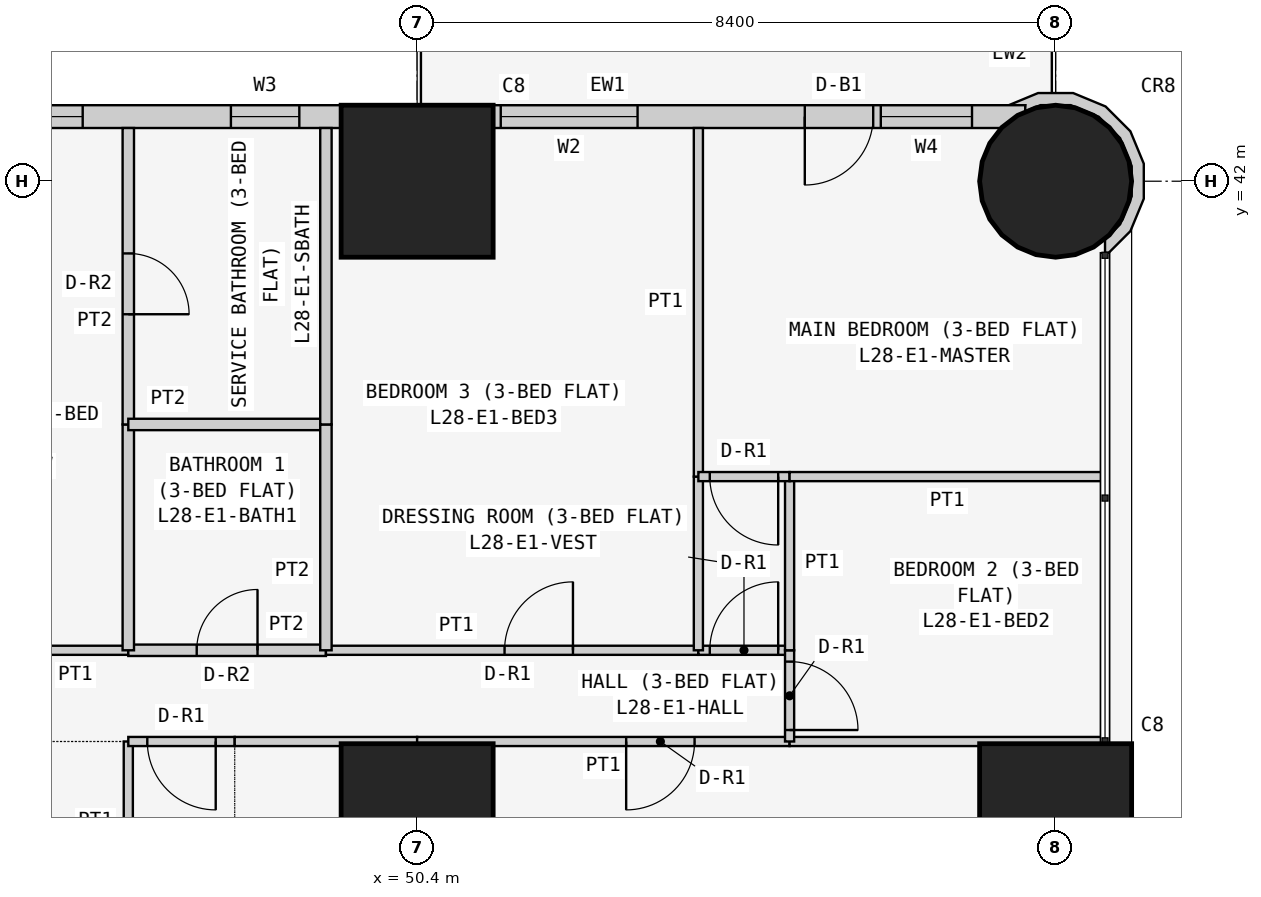
"""IFC4 building model, lengths in metres.
Left out: names, types, materials, properties, quantities, classifications, styles, units other than length and angle.
Written with IfcOpenShell. Run it as: python <this file> out.ifc"""

import sys

from ifc_helpers import new_model, si_unit, direction, frame, frame_2d, origin, origin_2d, place, context, subcontext, project, spatial, polyline, rectangle, circle, outline, extrude, element, fill, save


model = new_model("IFC4")
c1 = context("Model", 3, precision=1e-05, world=origin(), true_north=direction((0.0, 1.0)))
c2 = subcontext(c1, "Body", "Model", "MODEL_VIEW")
j1 = project(units=[si_unit("LENGTHUNIT", "METRE"), si_unit("PLANEANGLEUNIT", "RADIAN")], contexts=[c1])
p1 = place(None, origin())
s1 = spatial("IfcSite", under=j1, at=p1, CompositionType="ELEMENT")
p2 = place(p1, origin())
s2 = spatial("IfcBuilding", under=s1, at=p2, CompositionType="ELEMENT")
p3 = place(p2, frame((0.0, 0.0, 112.5)))
s3 = spatial("IfcBuildingStorey", under=s2, at=p3, CompositionType="ELEMENT", Elevation=112.5)
for number, where, z_axis, x_axis in (
    (1, (50.4, 33.6, 0.0), (0.0, 0.0, 1.0), (1.0, 0.0, 0.0)),
    (2, (50.4, 42.0, 0.0), (0.0, 0.0, 1.0), (1.0, 0.0, 0.0)),
    (3, (58.8, 33.6, 0.0), (0.0, 0.0, 1.0), (1.0, 0.0, 0.0)),
):
    element("IfcColumn", number, at=place(p3, frame(where, z_axis=z_axis, x_axis=x_axis)), inside=s3, PredefinedType="COLUMN", context=c2, shape_type="SweptSolid", body=[
        extrude(rectangle(XDim=2.0, YDim=2.0, at=origin_2d()), origin(), (0.0, 0.0, 1.0), 3.6),
    ])
p4 = place(p3, frame((58.8, 42.0, 0.0), z_axis=(0.0, 0.0, 1.0), x_axis=(1.0, 0.0, 0.0)))
e4 = element("IfcColumn", 4, at=p4, inside=s3, PredefinedType="COLUMN", context=c2, shape_type="SweptSolid", body=[
    extrude(circle(Radius=1.0, at=origin_2d()), origin(), (0.0, 0.0, 1.0), 3.6),
])
p5 = place(p3, frame((58.4, 42.85, 0.0), z_axis=(0.0, 0.0, 1.0), x_axis=(-1.0, 0.0, 0.0)))
e5 = element("IfcWall", 5, at=p5, inside=s3, PredefinedType="SOLIDWALL", context=c2, shape_type="SweptSolid", body=[
    extrude(rectangle(XDim=15.7, YDim=0.3, at=frame_2d((7.85, 0.0))), origin(), (0.0, 0.0, 1.0), 3.45),
])
p6 = place(p5, frame((12.4, 0.0, 0.9)))
e6 = element("IfcOpeningElement", 6, at=p6, cuts=e5, PredefinedType="OPENING", context=c2, shape_type="SweptSolid", body=[
    extrude(rectangle(XDim=1.8, YDim=1.5, at=frame_2d((0.9, 0.75))), frame((0.0, 0.16, 0.0), z_axis=(0.0, -1.0, 0.0), x_axis=(1.0, 0.0, 0.0)), (0.0, 0.0, 1.0), 0.32),
])
p7 = place(p5, frame((9.55, 0.0, 1.5)))
e7 = element("IfcOpeningElement", 7, at=p7, cuts=e5, PredefinedType="OPENING", context=c2, shape_type="SweptSolid", body=[
    extrude(rectangle(XDim=0.9, YDim=0.7, at=frame_2d((0.45, 0.35))), frame((0.0, 0.16, 0.0), z_axis=(0.0, -1.0, 0.0), x_axis=(1.0, 0.0, 0.0)), (0.0, 0.0, 1.0), 0.32),
])
p8 = place(p5, frame((5.1, 0.0, 0.9)))
e8 = element("IfcOpeningElement", 8, at=p8, cuts=e5, PredefinedType="OPENING", context=c2, shape_type="SweptSolid", body=[
    extrude(rectangle(XDim=1.8, YDim=1.5, at=frame_2d((0.9, 0.75))), frame((0.0, 0.16, 0.0), z_axis=(0.0, -1.0, 0.0), x_axis=(1.0, 0.0, 0.0)), (0.0, 0.0, 1.0), 0.32),
])
p9 = place(p5, frame((2.0, 0.0, 0.0)))
e9 = element("IfcOpeningElement", 9, at=p9, cuts=e5, PredefinedType="OPENING", context=c2, shape_type="SweptSolid", body=[
    extrude(rectangle(XDim=0.9, YDim=2.4, at=frame_2d((0.45, 1.2))), frame((0.0, 0.16, 0.0), z_axis=(0.0, -1.0, 0.0), x_axis=(1.0, 0.0, 0.0)), (0.0, 0.0, 1.0), 0.32),
])
p10 = place(p5, frame((0.7, 0.0, 0.9)))
e10 = element("IfcOpeningElement", 10, at=p10, cuts=e5, PredefinedType="OPENING", context=c2, shape_type="SweptSolid", body=[
    extrude(rectangle(XDim=1.2, YDim=1.5, at=frame_2d((0.6, 0.75))), frame((0.0, 0.16, 0.0), z_axis=(0.0, -1.0, 0.0), x_axis=(1.0, 0.0, 0.0)), (0.0, 0.0, 1.0), 0.32),
])
p11 = place(p3, frame((59.443, 41.132, 0.0), z_axis=(0.0, 0.0, 1.0), x_axis=(0.831199417842, 0.555974394895, 0.0)))
e11 = element("IfcWall", 11, at=p11, inside=s3, PredefinedType="SOLIDWALL", context=c2, shape_type="SweptSolid", body=[
    extrude(outline(polyline([(0.784, 0.242), (1.04, 0.626), (1.13, 1.078), (1.04, 1.531), (0.784, 1.915), (0.401, 2.171), (-0.009, 2.253), (0.171, 2.132), (0.113, 2.066), (0.339, 2.021), (0.67, 1.8), (0.891, 1.469), (0.968, 1.078), (0.89, 0.688), (0.669, 0.357), (0.338, 0.136), (0.062, 0.081), (-0.036, -0.066), (0.005, -0.093), (0.4, -0.014), (0.784, 0.242)])), origin(), (0.0, 0.0, 1.0), 3.45),
])
p12 = place(p3, frame((46.6, 29.4, 0.0), z_axis=(0.0, 0.0, 1.0), x_axis=(0.0, 1.0, 0.0)))
e12 = element("IfcWall", 12, at=p12, inside=s3, PredefinedType="PARTITIONING", context=c2, shape_type="SweptSolid", body=[
    extrude(rectangle(XDim=5.229, YDim=0.12, at=frame_2d((2.615, 0.0))), origin(), (0.0, 0.0, 1.0), 3.45),
])
p13 = place(p3, frame((48.0, 34.629, 0.0), z_axis=(0.0, 0.0, 1.0), x_axis=(-1.0, 0.0, 0.0)))
e13 = element("IfcWall", 13, at=p13, inside=s3, PredefinedType="PARTITIONING", context=c2, shape_type="SweptSolid", body=[
    extrude(rectangle(XDim=1.4, YDim=0.12, at=frame_2d((0.7, 0.0))), origin(), (0.0, 0.0, 1.0), 3.45),
])
p14 = place(p13, frame((0.25, 0.0, 0.0)))
e14 = element("IfcOpeningElement", 14, at=p14, cuts=e13, PredefinedType="OPENING", context=c2, shape_type="SweptSolid", body=[
    extrude(rectangle(XDim=0.9, YDim=2.1, at=frame_2d((0.45, 1.05))), frame((0.0, 0.07, 0.0), z_axis=(0.0, -1.0, 0.0), x_axis=(1.0, 0.0, 0.0)), (0.0, 0.0, 1.0), 0.14),
])
p15 = place(p3, frame((50.4, 34.629, 0.0), z_axis=(0.0, 0.0, 1.0), x_axis=(-1.0, 0.0, 0.0)))
e15 = element("IfcWall", 15, at=p15, inside=s3, PredefinedType="PARTITIONING", context=c2, shape_type="SweptSolid", body=[
    extrude(rectangle(XDim=2.4, YDim=0.12, at=frame_2d((1.2, 0.0))), origin(), (0.0, 0.0, 1.0), 3.45),
])
p16 = place(p3, frame((55.3, 34.629, 0.0), z_axis=(0.0, 0.0, 1.0), x_axis=(-1.0, 0.0, 0.0)))
e16 = element("IfcWall", 16, at=p16, inside=s3, PredefinedType="PARTITIONING", context=c2, shape_type="SweptSolid", body=[
    extrude(rectangle(XDim=4.9, YDim=0.12, at=frame_2d((2.45, 0.0))), origin(), (0.0, 0.0, 1.0), 3.45),
])
p17 = place(p16, frame((1.25, 0.0, 0.0)))
e17 = element("IfcOpeningElement", 17, at=p17, cuts=e16, PredefinedType="OPENING", context=c2, shape_type="SweptSolid", body=[
    extrude(rectangle(XDim=0.9, YDim=2.1, at=frame_2d((0.45, 1.05))), frame((0.0, 0.07, 0.0), z_axis=(0.0, -1.0, 0.0), x_axis=(1.0, 0.0, 0.0)), (0.0, 0.0, 1.0), 0.14),
])
p18 = place(p3, frame((59.45, 34.629, 0.0), z_axis=(0.0, 0.0, 1.0), x_axis=(-1.0, 0.0, 0.0)))
e18 = element("IfcWall", 18, at=p18, inside=s3, PredefinedType="PARTITIONING", context=c2, shape_type="SweptSolid", body=[
    extrude(rectangle(XDim=4.15, YDim=0.12, at=frame_2d((2.075, 0.0))), origin(), (0.0, 0.0, 1.0), 3.45),
])
p19 = place(p3, frame((46.6, 35.829, 0.0), z_axis=(0.0, 0.0, 1.0), x_axis=(-1.0, 0.0, 0.0)))
e19 = element("IfcWall", 19, at=p19, inside=s3, PredefinedType="PARTITIONING", context=c2, shape_type="SweptSolid", body=[
    extrude(rectangle(XDim=3.475, YDim=0.12, at=frame_2d((1.738, 0.0))), origin(), (0.0, 0.0, 1.0), 3.45),
])
p20 = place(p19, frame((1.35, 0.0, 0.0)))
e20 = element("IfcOpeningElement", 20, at=p20, cuts=e19, PredefinedType="OPENING", context=c2, shape_type="SweptSolid", body=[
    extrude(rectangle(XDim=0.9, YDim=2.1, at=frame_2d((0.45, 1.05))), frame((0.0, 0.07, 0.0), z_axis=(0.0, -1.0, 0.0), x_axis=(1.0, 0.0, 0.0)), (0.0, 0.0, 1.0), 0.14),
])
p21 = place(p3, frame((49.2, 35.829, 0.0), z_axis=(0.0, 0.0, 1.0), x_axis=(-1.0, 0.0, 0.0)))
e21 = element("IfcWall", 21, at=p21, inside=s3, PredefinedType="PARTITIONING", context=c2, shape_type="SweptSolid", body=[
    extrude(rectangle(XDim=2.6, YDim=0.15, at=frame_2d((1.3, 0.0))), origin(), (0.0, 0.0, 1.0), 3.45),
])
p22 = place(p21, frame((0.9, 0.0, 0.0)))
e22 = element("IfcOpeningElement", 22, at=p22, cuts=e21, PredefinedType="OPENING", context=c2, shape_type="SweptSolid", body=[
    extrude(rectangle(XDim=0.8, YDim=2.1, at=frame_2d((0.4, 1.05))), frame((0.0, 0.085, 0.0), z_axis=(0.0, -1.0, 0.0), x_axis=(1.0, 0.0, 0.0)), (0.0, 0.0, 1.0), 0.17),
])
p23 = place(p3, frame((54.1, 35.829, 0.0), z_axis=(0.0, 0.0, 1.0), x_axis=(-1.0, 0.0, 0.0)))
e23 = element("IfcWall", 23, at=p23, inside=s3, PredefinedType="PARTITIONING", context=c2, shape_type="SweptSolid", body=[
    extrude(rectangle(XDim=4.9, YDim=0.12, at=frame_2d((2.45, 0.0))), origin(), (0.0, 0.0, 1.0), 3.45),
])
p24 = place(p23, frame((1.65, 0.0, 0.0)))
e24 = element("IfcOpeningElement", 24, at=p24, cuts=e23, PredefinedType="OPENING", context=c2, shape_type="SweptSolid", body=[
    extrude(rectangle(XDim=0.9, YDim=2.1, at=frame_2d((0.45, 1.05))), frame((0.0, 0.07, 0.0), z_axis=(0.0, -1.0, 0.0), x_axis=(1.0, 0.0, 0.0)), (0.0, 0.0, 1.0), 0.14),
])
p25 = place(p3, frame((55.3, 35.829, 0.0), z_axis=(0.0, 0.0, 1.0), x_axis=(-1.0, 0.0, 0.0)))
e25 = element("IfcWall", 25, at=p25, inside=s3, PredefinedType="PARTITIONING", context=c2, shape_type="SweptSolid", body=[
    extrude(rectangle(XDim=1.2, YDim=0.12, at=frame_2d((0.6, 0.0))), origin(), (0.0, 0.0, 1.0), 3.45),
])
p26 = place(p25, frame((0.15, 0.0, 0.0)))
e26 = element("IfcOpeningElement", 26, at=p26, cuts=e25, PredefinedType="OPENING", context=c2, shape_type="SweptSolid", body=[
    extrude(rectangle(XDim=0.9, YDim=2.1, at=frame_2d((0.45, 1.05))), frame((0.0, 0.07, 0.0), z_axis=(0.0, -1.0, 0.0), x_axis=(1.0, 0.0, 0.0)), (0.0, 0.0, 1.0), 0.14),
])
p27 = place(p3, frame((55.3, 34.629, 0.0), z_axis=(0.0, 0.0, 1.0), x_axis=(0.0, 1.0, 0.0)))
e27 = element("IfcWall", 27, at=p27, inside=s3, PredefinedType="PARTITIONING", context=c2, shape_type="SweptSolid", body=[
    extrude(rectangle(XDim=1.2, YDim=0.12, at=frame_2d((0.6, 0.0))), origin(), (0.0, 0.0, 1.0), 3.45),
])
p28 = place(p27, frame((0.151, 0.0, 0.0)))
e28 = element("IfcOpeningElement", 28, at=p28, cuts=e27, PredefinedType="OPENING", context=c2, shape_type="SweptSolid", body=[
    extrude(rectangle(XDim=0.9, YDim=2.1, at=frame_2d((0.45, 1.05))), frame((0.0, 0.07, 0.0), z_axis=(0.0, -1.0, 0.0), x_axis=(1.0, 0.0, 0.0)), (0.0, 0.0, 1.0), 0.14),
])
p29 = place(p3, frame((46.6, 35.829, 0.0), z_axis=(0.0, 0.0, 1.0), x_axis=(0.0, 1.0, 0.0)))
e29 = element("IfcWall", 29, at=p29, inside=s3, PredefinedType="PARTITIONING", context=c2, shape_type="SweptSolid", body=[
    extrude(rectangle(XDim=2.971, YDim=0.15, at=frame_2d((1.485, 0.0))), origin(), (0.0, 0.0, 1.0), 3.45),
])
p30 = place(p3, frame((46.6, 38.8, 0.0), z_axis=(0.0, 0.0, 1.0), x_axis=(0.0, 1.0, 0.0)))
e30 = element("IfcWall", 30, at=p30, inside=s3, PredefinedType="PARTITIONING", context=c2, shape_type="SweptSolid", body=[
    extrude(rectangle(XDim=3.9, YDim=0.15, at=frame_2d((1.95, 0.0))), origin(), (0.0, 0.0, 1.0), 3.45),
])
p31 = place(p30, frame((1.45, 0.0, 0.0)))
e31 = element("IfcOpeningElement", 31, at=p31, cuts=e30, PredefinedType="OPENING", context=c2, shape_type="SweptSolid", body=[
    extrude(rectangle(XDim=0.8, YDim=2.1, at=frame_2d((0.4, 1.05))), frame((0.0, 0.085, 0.0), z_axis=(0.0, -1.0, 0.0), x_axis=(1.0, 0.0, 0.0)), (0.0, 0.0, 1.0), 0.17),
])
p32 = place(p3, frame((49.2, 38.8, 0.0), z_axis=(0.0, 0.0, 1.0), x_axis=(-1.0, 0.0, 0.0)))
e32 = element("IfcWall", 32, at=p32, inside=s3, PredefinedType="PARTITIONING", context=c2, shape_type="SweptSolid", body=[
    extrude(rectangle(XDim=2.6, YDim=0.15, at=frame_2d((1.3, 0.0))), origin(), (0.0, 0.0, 1.0), 3.45),
])
p33 = place(p3, frame((49.2, 35.829, 0.0), z_axis=(0.0, 0.0, 1.0), x_axis=(0.0, 1.0, 0.0)))
e33 = element("IfcWall", 33, at=p33, inside=s3, PredefinedType="PARTITIONING", context=c2, shape_type="SweptSolid", body=[
    extrude(rectangle(XDim=2.971, YDim=0.15, at=frame_2d((1.485, 0.0))), origin(), (0.0, 0.0, 1.0), 3.45),
])
p34 = place(p3, frame((49.2, 38.8, 0.0), z_axis=(0.0, 0.0, 1.0), x_axis=(0.0, 1.0, 0.0)))
e34 = element("IfcWall", 34, at=p34, inside=s3, PredefinedType="PARTITIONING", context=c2, shape_type="SweptSolid", body=[
    extrude(rectangle(XDim=3.9, YDim=0.15, at=frame_2d((1.95, 0.0))), origin(), (0.0, 0.0, 1.0), 3.45),
])
p35 = place(p3, frame((54.1, 35.829, 0.0), z_axis=(0.0, 0.0, 1.0), x_axis=(0.0, 1.0, 0.0)))
e35 = element("IfcWall", 35, at=p35, inside=s3, PredefinedType="PARTITIONING", context=c2, shape_type="SweptSolid", body=[
    extrude(rectangle(XDim=2.285, YDim=0.12, at=frame_2d((1.143, 0.0))), origin(), (0.0, 0.0, 1.0), 3.45),
])
p36 = place(p3, frame((54.1, 38.114, 0.0), z_axis=(0.0, 0.0, 1.0), x_axis=(0.0, 1.0, 0.0)))
e36 = element("IfcWall", 36, at=p36, inside=s3, PredefinedType="PARTITIONING", context=c2, shape_type="SweptSolid", body=[
    extrude(rectangle(XDim=4.586, YDim=0.12, at=frame_2d((2.293, 0.0))), origin(), (0.0, 0.0, 1.0), 3.45),
])
p37 = place(p3, frame((55.3, 35.829, 0.0), z_axis=(0.0, 0.0, 1.0), x_axis=(0.0, 1.0, 0.0)))
e37 = element("IfcWall", 37, at=p37, inside=s3, PredefinedType="PARTITIONING", context=c2, shape_type="SweptSolid", body=[
    extrude(rectangle(XDim=2.285, YDim=0.12, at=frame_2d((1.143, 0.0))), origin(), (0.0, 0.0, 1.0), 3.45),
])
p38 = place(p3, frame((55.3, 38.114, 0.0), z_axis=(0.0, 0.0, 1.0), x_axis=(-1.0, 0.0, 0.0)))
e38 = element("IfcWall", 38, at=p38, inside=s3, PredefinedType="PARTITIONING", context=c2, shape_type="SweptSolid", body=[
    extrude(rectangle(XDim=1.2, YDim=0.12, at=frame_2d((0.6, 0.0))), origin(), (0.0, 0.0, 1.0), 3.45),
])
p39 = place(p38, frame((0.15, 0.0, 0.0)))
e39 = element("IfcOpeningElement", 39, at=p39, cuts=e38, PredefinedType="OPENING", context=c2, shape_type="SweptSolid", body=[
    extrude(rectangle(XDim=0.9, YDim=2.1, at=frame_2d((0.45, 1.05))), frame((0.0, 0.07, 0.0), z_axis=(0.0, -1.0, 0.0), x_axis=(1.0, 0.0, 0.0)), (0.0, 0.0, 1.0), 0.14),
])
p40 = place(p3, frame((59.45, 38.114, 0.0), z_axis=(0.0, 0.0, 1.0), x_axis=(-1.0, 0.0, 0.0)))
e40 = element("IfcWall", 40, at=p40, inside=s3, PredefinedType="PARTITIONING", context=c2, shape_type="SweptSolid", body=[
    extrude(rectangle(XDim=4.15, YDim=0.12, at=frame_2d((2.075, 0.0))), origin(), (0.0, 0.0, 1.0), 3.45),
])
p41 = place(p6, origin())
e41 = element("IfcWindow", 41, at=p41, inside=s3, PartitioningType="SINGLE_PANEL", PredefinedType="WINDOW", context=c2, shape_type="SweptSolid", body=[
    extrude(rectangle(XDim=1.8, YDim=1.5, at=frame_2d((0.9, 0.75))), frame((0.0, 0.03, 0.0), z_axis=(0.0, -1.0, 0.0), x_axis=(1.0, 0.0, 0.0)), (0.0, 0.0, 1.0), 0.06),
])
fill(e6, e41)
p42 = place(p7, origin())
e42 = element("IfcWindow", 42, at=p42, inside=s3, PartitioningType="SINGLE_PANEL", PredefinedType="WINDOW", context=c2, shape_type="SweptSolid", body=[
    extrude(rectangle(XDim=0.9, YDim=0.7, at=frame_2d((0.45, 0.35))), frame((0.0, 0.03, 0.0), z_axis=(0.0, -1.0, 0.0), x_axis=(1.0, 0.0, 0.0)), (0.0, 0.0, 1.0), 0.06),
])
fill(e7, e42)
p43 = place(p8, origin())
e43 = element("IfcWindow", 43, at=p43, inside=s3, PartitioningType="SINGLE_PANEL", PredefinedType="WINDOW", context=c2, shape_type="SweptSolid", body=[
    extrude(rectangle(XDim=1.8, YDim=1.5, at=frame_2d((0.9, 0.75))), frame((0.0, 0.03, 0.0), z_axis=(0.0, -1.0, 0.0), x_axis=(1.0, 0.0, 0.0)), (0.0, 0.0, 1.0), 0.06),
])
fill(e8, e43)
p44 = place(p9, origin())
e44 = element("IfcDoor", 44, at=p44, inside=s3, OperationType="SINGLE_SWING_RIGHT", PredefinedType="DOOR", context=c2, shape_type="SweptSolid", body=[
    extrude(rectangle(XDim=0.9, YDim=2.4, at=frame_2d((0.45, 1.2))), frame((0.0, 0.025, 0.0), z_axis=(0.0, -1.0, 0.0), x_axis=(1.0, 0.0, 0.0)), (0.0, 0.0, 1.0), 0.05),
])
fill(e9, e44)
p45 = place(p10, origin())
e45 = element("IfcWindow", 45, at=p45, inside=s3, PartitioningType="SINGLE_PANEL", PredefinedType="WINDOW", context=c2, shape_type="SweptSolid", body=[
    extrude(rectangle(XDim=1.2, YDim=1.5, at=frame_2d((0.6, 0.75))), frame((0.0, 0.03, 0.0), z_axis=(0.0, -1.0, 0.0), x_axis=(1.0, 0.0, 0.0)), (0.0, 0.0, 1.0), 0.06),
])
fill(e10, e45)
p46 = place(p14, origin())
e46 = element("IfcDoor", 46, at=p46, inside=s3, OperationType="SINGLE_SWING_LEFT", PredefinedType="DOOR", context=c2, shape_type="SweptSolid", body=[
    extrude(rectangle(XDim=0.9, YDim=2.1, at=frame_2d((0.45, 1.05))), frame((0.0, 0.025, 0.0), z_axis=(0.0, -1.0, 0.0), x_axis=(1.0, 0.0, 0.0)), (0.0, 0.0, 1.0), 0.05),
])
fill(e14, e46)
p47 = place(p17, origin())
e47 = element("IfcDoor", 47, at=p47, inside=s3, OperationType="SINGLE_SWING_RIGHT", PredefinedType="DOOR", context=c2, shape_type="SweptSolid", body=[
    extrude(rectangle(XDim=0.9, YDim=2.1, at=frame_2d((0.45, 1.05))), frame((0.0, 0.025, 0.0), z_axis=(0.0, -1.0, 0.0), x_axis=(1.0, 0.0, 0.0)), (0.0, 0.0, 1.0), 0.05),
])
fill(e17, e47)
p48 = place(p31, frame((0.8, 0.0, 0.0), z_axis=(0.0, 0.0, 1.0), x_axis=(-1.0, 0.0, 0.0)))
e48 = element("IfcDoor", 48, at=p48, inside=s3, OperationType="SINGLE_SWING_RIGHT", PredefinedType="DOOR", context=c2, shape_type="SweptSolid", body=[
    extrude(rectangle(XDim=0.8, YDim=2.1, at=frame_2d((0.4, 1.05))), frame((0.0, 0.025, 0.0), z_axis=(0.0, -1.0, 0.0), x_axis=(1.0, 0.0, 0.0)), (0.0, 0.0, 1.0), 0.05),
])
fill(e31, e48)
p49 = place(p22, frame((0.8, 0.0, 0.0), z_axis=(0.0, 0.0, 1.0), x_axis=(-1.0, 0.0, 0.0)))
e49 = element("IfcDoor", 49, at=p49, inside=s3, OperationType="SINGLE_SWING_RIGHT", PredefinedType="DOOR", context=c2, shape_type="SweptSolid", body=[
    extrude(rectangle(XDim=0.8, YDim=2.1, at=frame_2d((0.4, 1.05))), frame((0.0, 0.025, 0.0), z_axis=(0.0, -1.0, 0.0), x_axis=(1.0, 0.0, 0.0)), (0.0, 0.0, 1.0), 0.05),
])
fill(e22, e49)
p50 = place(p24, frame((0.9, 0.0, 0.0), z_axis=(0.0, 0.0, 1.0), x_axis=(-1.0, 0.0, 0.0)))
e50 = element("IfcDoor", 50, at=p50, inside=s3, OperationType="SINGLE_SWING_RIGHT", PredefinedType="DOOR", context=c2, shape_type="SweptSolid", body=[
    extrude(rectangle(XDim=0.9, YDim=2.1, at=frame_2d((0.45, 1.05))), frame((0.0, 0.025, 0.0), z_axis=(0.0, -1.0, 0.0), x_axis=(1.0, 0.0, 0.0)), (0.0, 0.0, 1.0), 0.05),
])
fill(e24, e50)
p51 = place(p26, frame((0.9, 0.0, 0.0), z_axis=(0.0, 0.0, 1.0), x_axis=(-1.0, 0.0, 0.0)))
e51 = element("IfcDoor", 51, at=p51, inside=s3, OperationType="SINGLE_SWING_RIGHT", PredefinedType="DOOR", context=c2, shape_type="SweptSolid", body=[
    extrude(rectangle(XDim=0.9, YDim=2.1, at=frame_2d((0.45, 1.05))), frame((0.0, 0.025, 0.0), z_axis=(0.0, -1.0, 0.0), x_axis=(1.0, 0.0, 0.0)), (0.0, 0.0, 1.0), 0.05),
])
fill(e26, e51)
p52 = place(p39, origin())
e52 = element("IfcDoor", 52, at=p52, inside=s3, OperationType="SINGLE_SWING_LEFT", PredefinedType="DOOR", context=c2, shape_type="SweptSolid", body=[
    extrude(rectangle(XDim=0.9, YDim=2.1, at=frame_2d((0.45, 1.05))), frame((0.0, 0.025, 0.0), z_axis=(0.0, -1.0, 0.0), x_axis=(1.0, 0.0, 0.0)), (0.0, 0.0, 1.0), 0.05),
])
fill(e39, e52)
p53 = place(p28, frame((0.9, 0.0, 0.0), z_axis=(0.0, 0.0, 1.0), x_axis=(-1.0, 0.0, 0.0)))
e53 = element("IfcDoor", 53, at=p53, inside=s3, OperationType="SINGLE_SWING_RIGHT", PredefinedType="DOOR", context=c2, shape_type="SweptSolid", body=[
    extrude(rectangle(XDim=0.9, YDim=2.1, at=frame_2d((0.45, 1.05))), frame((0.0, 0.025, 0.0), z_axis=(0.0, -1.0, 0.0), x_axis=(1.0, 0.0, 0.0)), (0.0, 0.0, 1.0), 0.05),
])
fill(e28, e53)
save(model, sys.argv[1])
